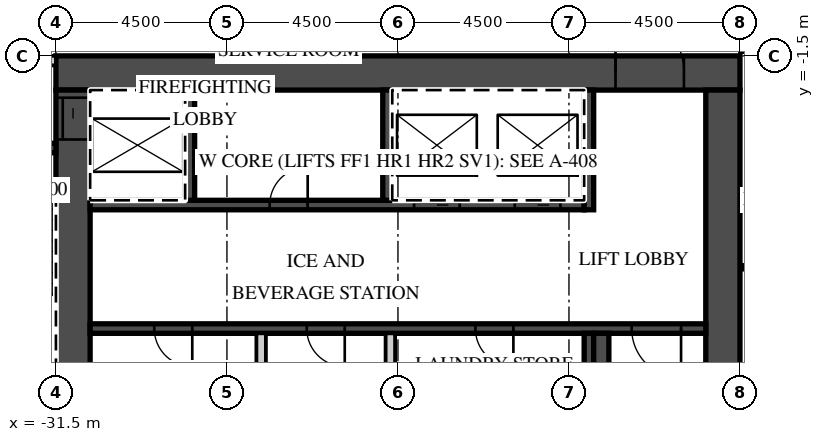
"""IFC4 building model, lengths in metres.
Left out: names, types, materials, properties, quantities, classifications, styles, units other than length and angle.
Written with IfcOpenShell. Run it as: python <this file> out.ifc"""

import sys

from ifc_helpers import new_model, si_unit, direction, frame, frame_2d, origin, place, context, subcontext, project, spatial, rectangle, extrude, element, fill, save


model = new_model("IFC4")
c1 = context("Model", 3, precision=1e-05, world=origin(), true_north=direction((0.0, 1.0)))
c2 = subcontext(c1, "Body", "Model", "MODEL_VIEW")
j1 = project(units=[si_unit("LENGTHUNIT", "METRE"), si_unit("PLANEANGLEUNIT", "RADIAN")], contexts=[c1])
p1 = place(None, origin())
s1 = spatial("IfcSite", under=j1, at=p1, CompositionType="ELEMENT")
p2 = place(p1, origin())
s2 = spatial("IfcBuilding", under=s1, at=p2, CompositionType="ELEMENT")
p3 = place(p2, frame((0.0, 0.0, 294.9)))
s3 = spatial("IfcBuildingStorey", under=s2, at=p3, CompositionType="ELEMENT", Elevation=294.9)
p4 = place(p3, frame((-13.5, -1.3, 0.0), z_axis=(0.0, 0.0, 1.0), x_axis=(1.0, 0.0, 0.0)))
e1 = element("IfcWall", 1, at=p4, inside=s3, PredefinedType="PARTITIONING", context=c2, shape_type="SweptSolid", body=[
    extrude(rectangle(XDim=50.293, YDim=0.2, at=frame_2d((25.146, 0.0))), origin(), (0.0, 0.0, 1.0), 3.02),
])
p5 = place(p4, frame((2.925, 0.0, 0.0)))
e2 = element("IfcOpeningElement", 2, at=p5, cuts=e1, PredefinedType="OPENING", context=c2, shape_type="SweptSolid", body=[
    extrude(rectangle(XDim=1.0, YDim=2.1, at=frame_2d((0.5, 1.05))), frame((0.0, 0.11, 0.0), z_axis=(0.0, -1.0, 0.0), x_axis=(1.0, 0.0, 0.0)), (0.0, 0.0, 1.0), 0.22),
])
p6 = place(p4, frame((7.45, 0.0, 0.0)))
e3 = element("IfcOpeningElement", 3, at=p6, cuts=e1, PredefinedType="OPENING", context=c2, shape_type="SweptSolid", body=[
    extrude(rectangle(XDim=1.0, YDim=2.1, at=frame_2d((0.5, 1.05))), frame((0.0, 0.11, 0.0), z_axis=(0.0, -1.0, 0.0), x_axis=(1.0, 0.0, 0.0)), (0.0, 0.0, 1.0), 0.22),
])
p7 = place(p4, frame((9.55, 0.0, 0.0)))
e4 = element("IfcOpeningElement", 4, at=p7, cuts=e1, PredefinedType="OPENING", context=c2, shape_type="SweptSolid", body=[
    extrude(rectangle(XDim=1.0, YDim=2.1, at=frame_2d((0.5, 1.05))), frame((0.0, 0.11, 0.0), z_axis=(0.0, -1.0, 0.0), x_axis=(1.0, 0.0, 0.0)), (0.0, 0.0, 1.0), 0.22),
])
p8 = place(p4, frame((18.862, 0.0, 0.0)))
e5 = element("IfcOpeningElement", 5, at=p8, cuts=e1, PredefinedType="OPENING", context=c2, shape_type="SweptSolid", body=[
    extrude(rectangle(XDim=1.2, YDim=2.1, at=frame_2d((0.6, 1.05))), frame((0.0, 0.11, 0.0), z_axis=(0.0, -1.0, 0.0), x_axis=(1.0, 0.0, 0.0)), (0.0, 0.0, 1.0), 0.22),
])
p9 = place(p4, frame((23.075, 0.0, 0.0)))
e6 = element("IfcOpeningElement", 6, at=p9, cuts=e1, PredefinedType="OPENING", context=c2, shape_type="SweptSolid", body=[
    extrude(rectangle(XDim=1.0, YDim=2.1, at=frame_2d((0.5, 1.05))), frame((0.0, 0.11, 0.0), z_axis=(0.0, -1.0, 0.0), x_axis=(1.0, 0.0, 0.0)), (0.0, 0.0, 1.0), 0.22),
])
p10 = place(p4, frame((29.925, 0.0, 0.0)))
e7 = element("IfcOpeningElement", 7, at=p10, cuts=e1, PredefinedType="OPENING", context=c2, shape_type="SweptSolid", body=[
    extrude(rectangle(XDim=1.0, YDim=2.1, at=frame_2d((0.5, 1.05))), frame((0.0, 0.11, 0.0), z_axis=(0.0, -1.0, 0.0), x_axis=(1.0, 0.0, 0.0)), (0.0, 0.0, 1.0), 0.22),
])
p11 = place(p4, frame((33.938, 0.0, 0.0)))
e8 = element("IfcOpeningElement", 8, at=p11, cuts=e1, PredefinedType="OPENING", context=c2, shape_type="SweptSolid", body=[
    extrude(rectangle(XDim=1.2, YDim=2.1, at=frame_2d((0.6, 1.05))), frame((0.0, 0.11, 0.0), z_axis=(0.0, -1.0, 0.0), x_axis=(1.0, 0.0, 0.0)), (0.0, 0.0, 1.0), 0.22),
])
p12 = place(p4, frame((43.45, 0.0, 0.0)))
e9 = element("IfcOpeningElement", 9, at=p12, cuts=e1, PredefinedType="OPENING", context=c2, shape_type="SweptSolid", body=[
    extrude(rectangle(XDim=1.0, YDim=2.1, at=frame_2d((0.5, 1.05))), frame((0.0, 0.11, 0.0), z_axis=(0.0, -1.0, 0.0), x_axis=(1.0, 0.0, 0.0)), (0.0, 0.0, 1.0), 0.22),
])
p13 = place(p4, frame((45.55, 0.0, 0.0)))
e10 = element("IfcOpeningElement", 10, at=p13, cuts=e1, PredefinedType="OPENING", context=c2, shape_type="SweptSolid", body=[
    extrude(rectangle(XDim=1.0, YDim=2.1, at=frame_2d((0.5, 1.05))), frame((0.0, 0.11, 0.0), z_axis=(0.0, -1.0, 0.0), x_axis=(1.0, 0.0, 0.0)), (0.0, 0.0, 1.0), 0.22),
])
p14 = place(p3, frame((-31.5, -1.95, 0.0), z_axis=(0.0, 0.0, 1.0), x_axis=(1.0, 0.0, 0.0)))
e11 = element("IfcWall", 11, at=p14, inside=s3, PredefinedType="SHEAR", context=c2, shape_type="SweptSolid", body=[
    extrude(rectangle(XDim=18.0, YDim=0.9, at=frame_2d((9.0, 0.0))), origin(), (0.0, 0.0, 1.0), 3.02),
])
p15 = place(p14, frame((14.725, 0.0, 0.0)))
e12 = element("IfcOpeningElement", 12, at=p15, cuts=e11, PredefinedType="OPENING", context=c2, shape_type="SweptSolid", body=[
    extrude(rectangle(XDim=1.8, YDim=2.1, at=frame_2d((0.9, 1.05))), frame((0.0, 0.46, 0.0), z_axis=(0.0, -1.0, 0.0), x_axis=(1.0, 0.0, 0.0)), (0.0, 0.0, 1.0), 0.92),
])
p16 = place(p3, frame((-31.05, -15.2, 0.0), z_axis=(0.0, 0.0, 1.0), x_axis=(0.0, 1.0, 0.0)))
e13 = element("IfcWall", 13, at=p16, inside=s3, PredefinedType="SHEAR", context=c2, shape_type="SweptSolid", body=[
    extrude(rectangle(XDim=12.8, YDim=0.9, at=frame_2d((6.4, 0.0))), origin(), (0.0, 0.0, 1.0), 3.02),
])
p17 = place(p16, frame((11.5, 0.0, 0.0)))
e14 = element("IfcOpeningElement", 14, at=p17, cuts=e13, PredefinedType="OPENING", context=c2, shape_type="SweptSolid", body=[
    extrude(rectangle(XDim=1.1, YDim=2.1, at=frame_2d((0.55, 1.05))), frame((0.0, 0.46, 0.0), z_axis=(0.0, -1.0, 0.0), x_axis=(1.0, 0.0, 0.0)), (0.0, 0.0, 1.0), 0.92),
])
p18 = place(p3, frame((-13.95, -14.6, 0.0), z_axis=(0.0, 0.0, 1.0), x_axis=(0.0, 1.0, 0.0)))
e15 = element("IfcWall", 15, at=p18, inside=s3, PredefinedType="SHEAR", context=c2, shape_type="SweptSolid", body=[
    extrude(rectangle(XDim=12.2, YDim=0.9, at=frame_2d((6.1, 0.0))), origin(), (0.0, 0.0, 1.0), 3.02),
])
p19 = place(p3, frame((-30.6, -5.425, 0.0), z_axis=(0.0, 0.0, 1.0), x_axis=(1.0, 0.0, 0.0)))
e16 = element("IfcWall", 16, at=p19, inside=s3, PredefinedType="SHEAR", context=c2, shape_type="SweptSolid", body=[
    extrude(rectangle(XDim=13.0, YDim=0.25, at=frame_2d((6.5, 0.0))), origin(), (0.0, 0.0, 1.0), 3.02),
])
p20 = place(p19, frame((8.525, 0.0, 0.0)))
e17 = element("IfcOpeningElement", 17, at=p20, cuts=e16, PredefinedType="OPENING", context=c2, shape_type="SweptSolid", body=[
    extrude(rectangle(XDim=1.2, YDim=2.1, at=frame_2d((0.6, 1.05))), frame((0.0, 0.135, 0.0), z_axis=(0.0, -1.0, 0.0), x_axis=(1.0, 0.0, 0.0)), (0.0, 0.0, 1.0), 0.27),
])
p21 = place(p19, frame((11.175, 0.0, 0.0)))
e18 = element("IfcOpeningElement", 18, at=p21, cuts=e16, PredefinedType="OPENING", context=c2, shape_type="SweptSolid", body=[
    extrude(rectangle(XDim=1.2, YDim=2.1, at=frame_2d((0.6, 1.05))), frame((0.0, 0.135, 0.0), z_axis=(0.0, -1.0, 0.0), x_axis=(1.0, 0.0, 0.0)), (0.0, 0.0, 1.0), 0.27),
])
p22 = place(p19, frame((4.725, 0.0, 0.0)))
e19 = element("IfcOpeningElement", 19, at=p22, cuts=e16, PredefinedType="OPENING", context=c2, shape_type="SweptSolid", body=[
    extrude(rectangle(XDim=1.0, YDim=2.1, at=frame_2d((0.5, 1.05))), frame((0.0, 0.135, 0.0), z_axis=(0.0, -1.0, 0.0), x_axis=(1.0, 0.0, 0.0)), (0.0, 0.0, 1.0), 0.27),
])
p23 = place(p3, frame((-17.475, -5.55, 0.0), z_axis=(0.0, 0.0, 1.0), x_axis=(0.0, 1.0, 0.0)))
e20 = element("IfcWall", 20, at=p23, inside=s3, PredefinedType="SHEAR", context=c2, shape_type="SweptSolid", body=[
    extrude(rectangle(XDim=3.15, YDim=0.25, at=frame_2d((1.575, 0.0))), origin(), (0.0, 0.0, 1.0), 3.02),
])
for number, where, z_axis, x_axis in (
    (21, (-27.975, -5.3, 0.0), (0.0, 0.0, 1.0), (0.0, 1.0, 0.0)),
    (22, (-22.775, -5.3, 0.0), (0.0, 0.0, 1.0), (0.0, 1.0, 0.0)),
):
    element("IfcWall", number, at=place(p3, frame(where, z_axis=z_axis, x_axis=x_axis)), inside=s3, PredefinedType="SHEAR", context=c2, shape_type="SweptSolid", body=[
        extrude(rectangle(XDim=2.9, YDim=0.25, at=frame_2d((1.45, 0.0))), origin(), (0.0, 0.0, 1.0), 3.02),
    ])
p24 = place(p3, frame((-30.6, -8.675, 0.0), z_axis=(0.0, 0.0, 1.0), x_axis=(1.0, 0.0, 0.0)))
e23 = element("IfcWall", 23, at=p24, inside=s3, PredefinedType="SHEAR", context=c2, shape_type="SweptSolid", body=[
    extrude(rectangle(XDim=16.2, YDim=0.25, at=frame_2d((8.1, 0.0))), origin(), (0.0, 0.0, 1.0), 3.02),
])
p25 = place(p24, frame((14.25, 0.0, 0.0)))
e24 = element("IfcOpeningElement", 24, at=p25, cuts=e23, PredefinedType="OPENING", context=c2, shape_type="SweptSolid", body=[
    extrude(rectangle(XDim=1.3, YDim=2.1, at=frame_2d((0.65, 1.05))), frame((0.0, 0.135, 0.0), z_axis=(0.0, -1.0, 0.0), x_axis=(1.0, 0.0, 0.0)), (0.0, 0.0, 1.0), 0.27),
])
p26 = place(p24, frame((1.688, 0.0, 0.0)))
e25 = element("IfcOpeningElement", 25, at=p26, cuts=e23, PredefinedType="OPENING", context=c2, shape_type="SweptSolid", body=[
    extrude(rectangle(XDim=1.0, YDim=2.1, at=frame_2d((0.5, 1.05))), frame((0.0, 0.135, 0.0), z_axis=(0.0, -1.0, 0.0), x_axis=(1.0, 0.0, 0.0)), (0.0, 0.0, 1.0), 0.27),
])
p27 = place(p24, frame((5.7, 0.0, 0.0)))
e26 = element("IfcOpeningElement", 26, at=p27, cuts=e23, PredefinedType="OPENING", context=c2, shape_type="SweptSolid", body=[
    extrude(rectangle(XDim=1.0, YDim=2.1, at=frame_2d((0.5, 1.05))), frame((0.0, 0.135, 0.0), z_axis=(0.0, -1.0, 0.0), x_axis=(1.0, 0.0, 0.0)), (0.0, 0.0, 1.0), 0.27),
])
p28 = place(p24, frame((10.137, 0.0, 0.0)))
e27 = element("IfcOpeningElement", 27, at=p28, cuts=e23, PredefinedType="OPENING", context=c2, shape_type="SweptSolid", body=[
    extrude(rectangle(XDim=1.0, YDim=2.1, at=frame_2d((0.5, 1.05))), frame((0.0, 0.135, 0.0), z_axis=(0.0, -1.0, 0.0), x_axis=(1.0, 0.0, 0.0)), (0.0, 0.0, 1.0), 0.27),
])
p29 = place(p3, frame((-17.475, -11.7, 0.0), z_axis=(0.0, 0.0, 1.0), x_axis=(0.0, 1.0, 0.0)))
e28 = element("IfcWall", 28, at=p29, inside=s3, PredefinedType="SHEAR", context=c2, shape_type="SweptSolid", body=[
    extrude(rectangle(XDim=2.9, YDim=0.25, at=frame_2d((1.45, 0.0))), origin(), (0.0, 0.0, 1.0), 3.02),
])
for number, where, z_axis, x_axis in (
    (29, (-26.1, -11.7, 0.0), (0.0, 0.0, 1.0), (0.0, 1.0, 0.0)),
    (30, (-22.7, -11.7, 0.0), (0.0, 0.0, 1.0), (0.0, 1.0, 0.0)),
):
    element("IfcWall", number, at=place(p3, frame(where, z_axis=z_axis, x_axis=x_axis)), inside=s3, PredefinedType="PARTITIONING", context=c2, shape_type="SweptSolid", body=[
        extrude(rectangle(XDim=2.9, YDim=0.25, at=frame_2d((1.45, 0.0))), origin(), (0.0, 0.0, 1.0), 3.02),
    ])
p30 = place(p3, frame((-17.15, -14.6, 0.0), z_axis=(0.0, 0.0, 1.0), x_axis=(0.0, 1.0, 0.0)))
e31 = element("IfcWall", 31, at=p30, inside=s3, PredefinedType="SHEAR", context=c2, shape_type="SweptSolid", body=[
    extrude(rectangle(XDim=5.8, YDim=0.4, at=frame_2d((2.9, 0.0))), origin(), (0.0, 0.0, 1.0), 3.02),
])
p31 = place(p3, frame((-39.627, -1.625, 0.0), z_axis=(0.0, 0.0, 1.0), x_axis=(1.0, 0.0, 0.0)))
e32 = element("IfcWall", 32, at=p31, inside=s3, PredefinedType="PARTITIONING", context=c2, shape_type="SweptSolid", body=[
    extrude(rectangle(XDim=8.127, YDim=0.25, at=frame_2d((4.063, 0.0))), origin(), (0.0, 0.0, 1.0), 3.02),
])
p32 = place(p31, frame((6.202, 0.0, 0.0)))
e33 = element("IfcOpeningElement", 33, at=p32, cuts=e32, PredefinedType="OPENING", context=c2, shape_type="SweptSolid", body=[
    extrude(rectangle(XDim=1.3, YDim=2.1, at=frame_2d((0.65, 1.05))), frame((0.0, 0.135, 0.0), z_axis=(0.0, -1.0, 0.0), x_axis=(1.0, 0.0, 0.0)), (0.0, 0.0, 1.0), 0.27),
])
p33 = place(p31, frame((3.777, 0.0, 0.0)))
e34 = element("IfcOpeningElement", 34, at=p33, cuts=e32, PredefinedType="OPENING", context=c2, shape_type="SweptSolid", body=[
    extrude(rectangle(XDim=1.1, YDim=2.1, at=frame_2d((0.55, 1.05))), frame((0.0, 0.135, 0.0), z_axis=(0.0, -1.0, 0.0), x_axis=(1.0, 0.0, 0.0)), (0.0, 0.0, 1.0), 0.27),
])
p34 = place(p3, frame((-34.05, -3.925, 0.0), z_axis=(0.0, 0.0, 1.0), x_axis=(1.0, 0.0, 0.0)))
e35 = element("IfcWall", 35, at=p34, inside=s3, PredefinedType="SHEAR", context=c2, shape_type="SweptSolid", body=[
    extrude(rectangle(XDim=2.55, YDim=0.25, at=frame_2d((1.275, 0.0))), origin(), (0.0, 0.0, 1.0), 3.02),
])
p35 = place(p34, frame((0.625, 0.0, 0.0)))
e36 = element("IfcOpeningElement", 36, at=p35, cuts=e35, PredefinedType="OPENING", context=c2, shape_type="SweptSolid", body=[
    extrude(rectangle(XDim=1.3, YDim=2.1, at=frame_2d((0.65, 1.05))), frame((0.0, 0.135, 0.0), z_axis=(0.0, -1.0, 0.0), x_axis=(1.0, 0.0, 0.0)), (0.0, 0.0, 1.0), 0.27),
])
p36 = place(p20, origin())
e37 = element("IfcDoor", 37, at=p36, inside=s3, OperationType="SLIDING_TO_LEFT", PredefinedType="DOOR", context=c2, shape_type="SweptSolid", body=[
    extrude(rectangle(XDim=1.2, YDim=2.1, at=frame_2d((0.6, 1.05))), frame((0.0, 0.025, 0.0), z_axis=(0.0, -1.0, 0.0), x_axis=(1.0, 0.0, 0.0)), (0.0, 0.0, 1.0), 0.05),
])
fill(e17, e37)
p37 = place(p21, origin())
e38 = element("IfcDoor", 38, at=p37, inside=s3, OperationType="SLIDING_TO_RIGHT", PredefinedType="DOOR", context=c2, shape_type="SweptSolid", body=[
    extrude(rectangle(XDim=1.2, YDim=2.1, at=frame_2d((0.6, 1.05))), frame((0.0, 0.025, 0.0), z_axis=(0.0, -1.0, 0.0), x_axis=(1.0, 0.0, 0.0)), (0.0, 0.0, 1.0), 0.05),
])
fill(e18, e38)
p38 = place(p17, origin())
e39 = element("IfcDoor", 39, at=p38, inside=s3, OperationType="SLIDING_TO_RIGHT", PredefinedType="DOOR", context=c2, shape_type="SweptSolid", body=[
    extrude(rectangle(XDim=1.1, YDim=2.1, at=frame_2d((0.55, 1.05))), frame((0.0, 0.025, 0.0), z_axis=(0.0, -1.0, 0.0), x_axis=(1.0, 0.0, 0.0)), (0.0, 0.0, 1.0), 0.05),
])
fill(e14, e39)
p39 = place(p15, origin())
e40 = element("IfcDoor", 40, at=p39, inside=s3, OperationType="DOUBLE_DOOR_DOUBLE_SWING", PredefinedType="DOOR", context=c2, shape_type="SweptSolid", body=[
    extrude(rectangle(XDim=1.8, YDim=2.1, at=frame_2d((0.9, 1.05))), frame((0.0, 0.025, 0.0), z_axis=(0.0, -1.0, 0.0), x_axis=(1.0, 0.0, 0.0)), (0.0, 0.0, 1.0), 0.05),
])
fill(e12, e40)
p40 = place(p25, origin())
e41 = element("IfcDoor", 41, at=p40, inside=s3, OperationType="SINGLE_SWING_RIGHT", PredefinedType="DOOR", context=c2, shape_type="SweptSolid", body=[
    extrude(rectangle(XDim=1.3, YDim=2.1, at=frame_2d((0.65, 1.05))), frame((0.0, 0.025, 0.0), z_axis=(0.0, -1.0, 0.0), x_axis=(1.0, 0.0, 0.0)), (0.0, 0.0, 1.0), 0.05),
])
fill(e24, e41)
p41 = place(p26, origin())
e42 = element("IfcDoor", 42, at=p41, inside=s3, OperationType="SINGLE_SWING_RIGHT", PredefinedType="DOOR", context=c2, shape_type="SweptSolid", body=[
    extrude(rectangle(XDim=1.0, YDim=2.1, at=frame_2d((0.5, 1.05))), frame((0.0, 0.025, 0.0), z_axis=(0.0, -1.0, 0.0), x_axis=(1.0, 0.0, 0.0)), (0.0, 0.0, 1.0), 0.05),
])
fill(e25, e42)
p42 = place(p27, origin())
e43 = element("IfcDoor", 43, at=p42, inside=s3, OperationType="SINGLE_SWING_RIGHT", PredefinedType="DOOR", context=c2, shape_type="SweptSolid", body=[
    extrude(rectangle(XDim=1.0, YDim=2.1, at=frame_2d((0.5, 1.05))), frame((0.0, 0.025, 0.0), z_axis=(0.0, -1.0, 0.0), x_axis=(1.0, 0.0, 0.0)), (0.0, 0.0, 1.0), 0.05),
])
fill(e26, e43)
p43 = place(p28, origin())
e44 = element("IfcDoor", 44, at=p43, inside=s3, OperationType="SINGLE_SWING_RIGHT", PredefinedType="DOOR", context=c2, shape_type="SweptSolid", body=[
    extrude(rectangle(XDim=1.0, YDim=2.1, at=frame_2d((0.5, 1.05))), frame((0.0, 0.025, 0.0), z_axis=(0.0, -1.0, 0.0), x_axis=(1.0, 0.0, 0.0)), (0.0, 0.0, 1.0), 0.05),
])
fill(e27, e44)
p44 = place(p22, origin())
e45 = element("IfcDoor", 45, at=p44, inside=s3, OperationType="SINGLE_SWING_RIGHT", PredefinedType="DOOR", context=c2, shape_type="SweptSolid", body=[
    extrude(rectangle(XDim=1.0, YDim=2.1, at=frame_2d((0.5, 1.05))), frame((0.0, 0.025, 0.0), z_axis=(0.0, -1.0, 0.0), x_axis=(1.0, 0.0, 0.0)), (0.0, 0.0, 1.0), 0.05),
])
fill(e19, e45)
save(model, sys.argv[1])
